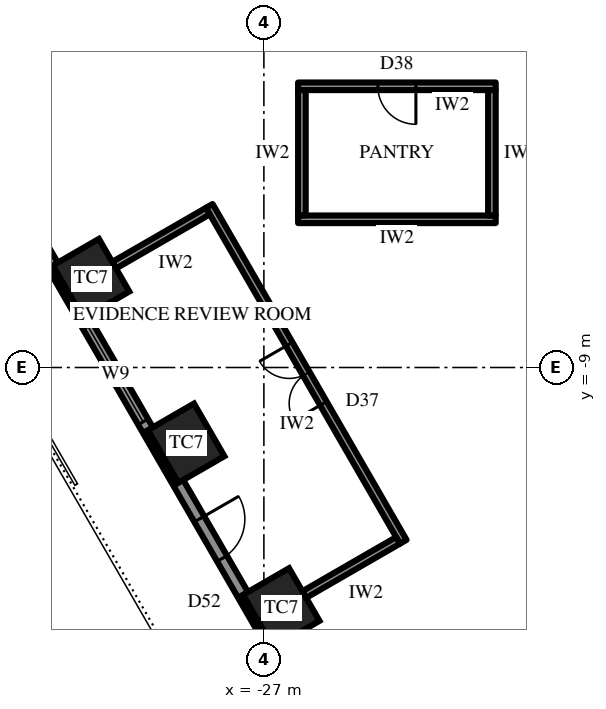
"""IFC4 building model, lengths in metres.
Left out: names, types, materials, properties, quantities, classifications, styles, units other than length and angle.
Written with IfcOpenShell. Run it as: python <this file> out.ifc"""

import sys

from ifc_helpers import new_model, si_unit, direction, frame, frame_2d, origin, origin_2d, place, context, subcontext, project, spatial, rectangle, extrude, element, fill, save


model = new_model("IFC4")
c1 = context("Model", 3, precision=1e-05, world=origin(), true_north=direction((0.0, 1.0)))
c2 = subcontext(c1, "Body", "Model", "MODEL_VIEW")
j1 = project(units=[si_unit("LENGTHUNIT", "METRE"), si_unit("PLANEANGLEUNIT", "RADIAN")], contexts=[c1])
p1 = place(None, origin())
s1 = spatial("IfcSite", under=j1, at=p1, CompositionType="ELEMENT")
p2 = place(p1, origin())
s2 = spatial("IfcBuilding", under=s1, at=p2, CompositionType="ELEMENT")
p3 = place(p2, frame((0.0, 0.0, 161.5)))
s3 = spatial("IfcBuildingStorey", under=s2, at=p3, CompositionType="ELEMENT", Elevation=161.5)
for number, where, z_axis, x_axis in (
    (1, (-31.547, -6.658, 0.0), (0.0, 0.0, 1.0), (0.5, -0.866, 0.0)),
    (2, (-29.045, -10.992, 0.0), (0.0, 0.0, 1.0), (0.5, -0.866, 0.0)),
    (3, (-26.544, -15.325, 0.0), (0.0, 0.0, 1.0), (0.5, -0.866, 0.0)),
):
    element("IfcColumn", number, at=place(p3, frame(where, z_axis=z_axis, x_axis=x_axis)), inside=s3, PredefinedType="COLUMN", context=c2, shape_type="SweptSolid", body=[
        extrude(rectangle(XDim=1.6, YDim=1.4, at=origin_2d()), origin(), (0.0, 0.0, 1.0), 4.2),
    ])
p4 = place(p3, frame((-34.656, -2.675, 0.0), z_axis=(0.0, 0.0, 1.0), x_axis=(0.500003084452, -0.866023622968, 0.0)))
e4 = element("IfcWall", 4, at=p4, inside=s3, PredefinedType="SOLIDWALL", context=c2, shape_type="SweptSolid", body=[
    extrude(rectangle(XDim=30.022, YDim=0.3, at=frame_2d((15.011, 0.0))), origin(), (0.0, 0.0, 1.0), 2.75),
])
p5 = place(p4, frame((1.052, 0.0, 0.6)))
e5 = element("IfcOpeningElement", 5, at=p5, cuts=e4, PredefinedType="OPENING", context=c2, shape_type="SweptSolid", body=[
    extrude(rectangle(XDim=2.9, YDim=1.9, at=frame_2d((1.45, 0.95))), frame((0.0, 0.16, 0.0), z_axis=(0.0, -1.0, 0.0), x_axis=(1.0, 0.0, 0.0)), (0.0, 0.0, 1.0), 0.32),
])
p6 = place(p4, frame((6.056, 0.0, 0.6)))
e6 = element("IfcOpeningElement", 6, at=p6, cuts=e4, PredefinedType="OPENING", context=c2, shape_type="SweptSolid", body=[
    extrude(rectangle(XDim=2.9, YDim=1.9, at=frame_2d((1.45, 0.95))), frame((0.0, 0.16, 0.0), z_axis=(0.0, -1.0, 0.0), x_axis=(1.0, 0.0, 0.0)), (0.0, 0.0, 1.0), 0.32),
])
p7 = place(p4, frame((11.909, 0.0, 0.0)))
e7 = element("IfcOpeningElement", 7, at=p7, cuts=e4, PredefinedType="OPENING", context=c2, shape_type="SweptSolid", body=[
    extrude(rectangle(XDim=1.2, YDim=2.4, at=frame_2d((0.6, 1.2))), frame((0.0, 0.16, 0.0), z_axis=(0.0, -1.0, 0.0), x_axis=(1.0, 0.0, 0.0)), (0.0, 0.0, 1.0), 0.32),
])
p8 = place(p4, frame((16.063, 0.0, 0.6)))
e8 = element("IfcOpeningElement", 8, at=p8, cuts=e4, PredefinedType="OPENING", context=c2, shape_type="SweptSolid", body=[
    extrude(rectangle(XDim=2.9, YDim=1.9, at=frame_2d((1.45, 0.95))), frame((0.0, 0.16, 0.0), z_axis=(0.0, -1.0, 0.0), x_axis=(1.0, 0.0, 0.0)), (0.0, 0.0, 1.0), 0.32),
])
p9 = place(p4, frame((21.067, 0.0, 0.6)))
e9 = element("IfcOpeningElement", 9, at=p9, cuts=e4, PredefinedType="OPENING", context=c2, shape_type="SweptSolid", body=[
    extrude(rectangle(XDim=2.9, YDim=1.9, at=frame_2d((1.45, 0.95))), frame((0.0, 0.16, 0.0), z_axis=(0.0, -1.0, 0.0), x_axis=(1.0, 0.0, 0.0)), (0.0, 0.0, 1.0), 0.32),
])
p10 = place(p4, frame((26.07, 0.0, 0.6)))
e10 = element("IfcOpeningElement", 10, at=p10, cuts=e4, PredefinedType="OPENING", context=c2, shape_type="SweptSolid", body=[
    extrude(rectangle(XDim=2.9, YDim=1.9, at=frame_2d((1.45, 0.95))), frame((0.0, 0.16, 0.0), z_axis=(0.0, -1.0, 0.0), x_axis=(1.0, 0.0, 0.0)), (0.0, 0.0, 1.0), 0.32),
])
p11 = place(p3, frame((-28.436, -4.747, 0.0), z_axis=(0.0, 0.0, 1.0), x_axis=(0.499987468925, -0.866032638483, 0.0)))
e11 = element("IfcWall", 11, at=p11, inside=s3, PredefinedType="PARTITIONING", context=c2, shape_type="SweptSolid", body=[
    extrude(rectangle(XDim=10.207, YDim=0.2, at=frame_2d((5.104, 0.0))), origin(), (0.0, 0.0, 1.0), 4.0),
])
p12 = place(p11, frame((4.204, 0.0, 0.0)))
e12 = element("IfcOpeningElement", 12, at=p12, cuts=e11, PredefinedType="OPENING", context=c2, shape_type="SweptSolid", body=[
    extrude(rectangle(XDim=1.8, YDim=2.4, at=frame_2d((0.9, 1.2))), frame((0.0, 0.11, 0.0), z_axis=(0.0, -1.0, 0.0), x_axis=(1.0, 0.0, 0.0)), (0.0, 0.0, 1.0), 0.22),
])
p13 = place(p3, frame((-28.473, -4.883, 0.0), z_axis=(0.0, 0.0, 1.0), x_axis=(-0.866025820012, -0.499999279071, 0.0)))
e13 = element("IfcWall", 13, at=p13, inside=s3, PredefinedType="PARTITIONING", context=c2, shape_type="SweptSolid", body=[
    extrude(rectangle(XDim=2.85, YDim=0.2, at=frame_2d((1.425, 0.0))), origin(), (0.0, 0.0, 1.0), 3.082),
])
p14 = place(p3, frame((-23.469, -13.55, 0.0), z_axis=(0.0, 0.0, 1.0), x_axis=(-0.866025820012, -0.499999279071, 0.0)))
e14 = element("IfcWall", 14, at=p14, inside=s3, PredefinedType="PARTITIONING", context=c2, shape_type="SweptSolid", body=[
    extrude(rectangle(XDim=2.85, YDim=0.2, at=frame_2d((1.425, 0.0))), origin(), (0.0, 0.0, 1.0), 4.0),
])
p15 = place(p3, frame((-20.9, -1.6, 0.0), z_axis=(0.0, 0.0, 1.0), x_axis=(-1.0, 0.0, 0.0)))
e15 = element("IfcWall", 15, at=p15, inside=s3, PredefinedType="PARTITIONING", context=c2, shape_type="SweptSolid", body=[
    extrude(rectangle(XDim=5.2, YDim=0.2, at=frame_2d((2.6, 0.0))), origin(), (0.0, 0.0, 1.0), 4.0),
])
p16 = place(p15, frame((2.1, 0.0, 0.0)))
e16 = element("IfcOpeningElement", 16, at=p16, cuts=e15, PredefinedType="OPENING", context=c2, shape_type="SweptSolid", body=[
    extrude(rectangle(XDim=1.0, YDim=2.2, at=frame_2d((0.5, 1.1))), frame((0.0, 0.11, 0.0), z_axis=(0.0, -1.0, 0.0), x_axis=(1.0, 0.0, 0.0)), (0.0, 0.0, 1.0), 0.22),
])
p17 = place(p3, frame((-20.9, -5.1, 0.0), z_axis=(0.0, 0.0, 1.0), x_axis=(-1.0, 0.0, 0.0)))
e17 = element("IfcWall", 17, at=p17, inside=s3, PredefinedType="PARTITIONING", context=c2, shape_type="SweptSolid", body=[
    extrude(rectangle(XDim=5.2, YDim=0.2, at=frame_2d((2.6, 0.0))), origin(), (0.0, 0.0, 1.0), 4.0),
])
for number, where, z_axis, x_axis in (
    (18, (-21.0, -1.7, 0.0), (0.0, 0.0, 1.0), (0.0, -1.0, 0.0)),
    (19, (-26.0, -1.7, 0.0), (0.0, 0.0, 1.0), (0.0, -1.0, 0.0)),
):
    element("IfcWall", number, at=place(p3, frame(where, z_axis=z_axis, x_axis=x_axis)), inside=s3, PredefinedType="PARTITIONING", context=c2, shape_type="SweptSolid", body=[
        extrude(rectangle(XDim=3.3, YDim=0.2, at=frame_2d((1.65, 0.0))), origin(), (0.0, 0.0, 1.0), 4.0),
    ])
p18 = place(p6, origin())
e20 = element("IfcWindow", 20, at=p18, inside=s3, PartitioningType="SINGLE_PANEL", PredefinedType="WINDOW", context=c2, shape_type="SweptSolid", body=[
    extrude(rectangle(XDim=2.9, YDim=1.9, at=frame_2d((1.45, 0.95))), frame((0.0, 0.03, 0.0), z_axis=(0.0, -1.0, 0.0), x_axis=(1.0, 0.0, 0.0)), (0.0, 0.0, 1.0), 0.06),
])
fill(e6, e20)
p19 = place(p7, origin())
e21 = element("IfcDoor", 21, at=p19, inside=s3, OperationType="SINGLE_SWING_RIGHT", PredefinedType="DOOR", context=c2, shape_type="SweptSolid", body=[
    extrude(rectangle(XDim=1.2, YDim=2.4, at=frame_2d((0.6, 1.2))), frame((0.0, 0.025, 0.0), z_axis=(0.0, -1.0, 0.0), x_axis=(1.0, 0.0, 0.0)), (0.0, 0.0, 1.0), 0.05),
])
fill(e7, e21)
p20 = place(p12, frame((1.8, 0.0, 0.0), z_axis=(0.0, 0.0, 1.0), x_axis=(-1.0, 0.0, 0.0)))
e22 = element("IfcDoor", 22, at=p20, inside=s3, OperationType="DOUBLE_DOOR_SINGLE_SWING", PredefinedType="DOOR", context=c2, shape_type="SweptSolid", body=[
    extrude(rectangle(XDim=1.8, YDim=2.4, at=frame_2d((0.9, 1.2))), frame((0.0, 0.025, 0.0), z_axis=(0.0, -1.0, 0.0), x_axis=(1.0, 0.0, 0.0)), (0.0, 0.0, 1.0), 0.05),
])
fill(e12, e22)
p21 = place(p16, origin())
e23 = element("IfcDoor", 23, at=p21, inside=s3, OperationType="SINGLE_SWING_RIGHT", PredefinedType="DOOR", context=c2, shape_type="SweptSolid", body=[
    extrude(rectangle(XDim=1.0, YDim=2.2, at=frame_2d((0.5, 1.1))), frame((0.0, 0.025, 0.0), z_axis=(0.0, -1.0, 0.0), x_axis=(1.0, 0.0, 0.0)), (0.0, 0.0, 1.0), 0.05),
])
fill(e16, e23)
save(model, sys.argv[1])
